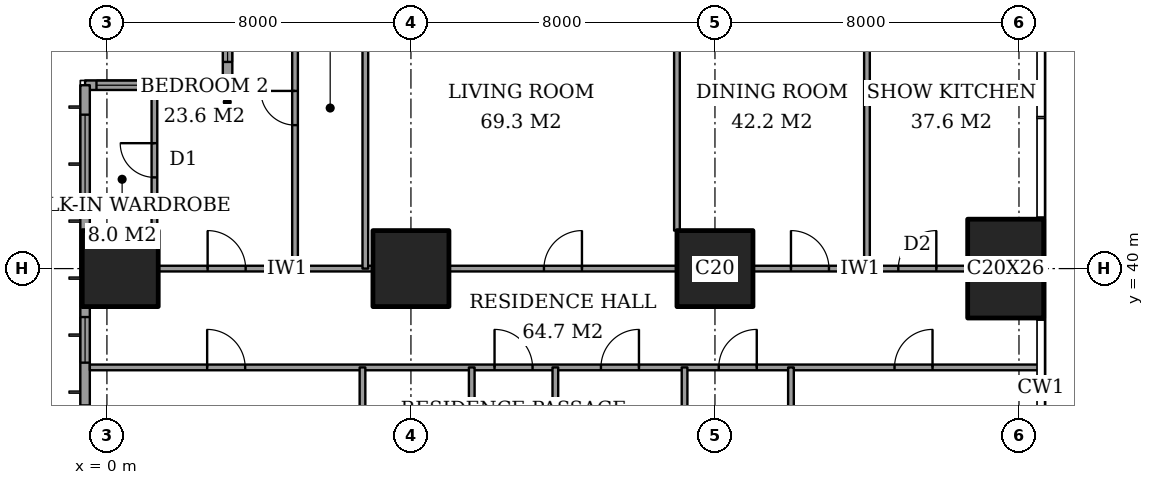
"""IFC4 building model, lengths in metres.
Left out: names, types, materials, properties, quantities, classifications, styles, units other than length and angle.
Written with IfcOpenShell. Run it as: python <this file> out.ifc"""

import sys

from ifc_helpers import new_model, si_unit, direction, frame, frame_2d, origin, origin_2d, place, context, subcontext, project, spatial, rectangle, extrude, element, fill, save


model = new_model("IFC4")
c1 = context("Model", 3, precision=1e-05, world=origin(), true_north=direction((0.0, 1.0)))
c2 = subcontext(c1, "Body", "Model", "MODEL_VIEW")
j1 = project(units=[si_unit("LENGTHUNIT", "METRE"), si_unit("PLANEANGLEUNIT", "RADIAN")], contexts=[c1])
p1 = place(None, origin())
s1 = spatial("IfcSite", under=j1, at=p1, CompositionType="ELEMENT")
p2 = place(p1, origin())
s2 = spatial("IfcBuilding", under=s1, at=p2, CompositionType="ELEMENT")
p3 = place(p2, frame((0.0, 0.0, 65.6)))
s3 = spatial("IfcBuildingStorey", under=s2, at=p3, CompositionType="ELEMENT", Elevation=65.6)
for number, where, z_axis, x_axis in (
    (1, (0.35, 40.0, 0.0), (0.0, 0.0, 1.0), (1.0, 0.0, 0.0)),
    (2, (8.0, 40.0, 0.0), (0.0, 0.0, 1.0), (1.0, 0.0, 0.0)),
    (3, (16.0, 40.0, 0.0), (0.0, 0.0, 1.0), (1.0, 0.0, 0.0)),
):
    element("IfcColumn", number, at=place(p3, frame(where, z_axis=z_axis, x_axis=x_axis)), inside=s3, PredefinedType="COLUMN", context=c2, shape_type="SweptSolid", body=[
        extrude(rectangle(XDim=2.0, YDim=2.0, at=origin_2d()), origin(), (0.0, 0.0, 1.0), 3.6),
    ])
p4 = place(p3, frame((23.65, 40.0, 0.0), z_axis=(0.0, 0.0, 1.0), x_axis=(1.0, 0.0, 0.0)))
e4 = element("IfcColumn", 4, at=p4, inside=s3, PredefinedType="COLUMN", context=c2, shape_type="SweptSolid", body=[
    extrude(rectangle(XDim=2.0, YDim=2.6, at=origin_2d()), origin(), (0.0, 0.0, 1.0), 3.6),
])
p5 = place(p3, frame((3.175, 48.575, 0.0), z_axis=(0.0, 0.0, 1.0), x_axis=(0.0, -1.0, 0.0)))
e5 = element("IfcWall", 5, at=p5, inside=s3, PredefinedType="SOLIDWALL", context=c2, shape_type="SweptSolid", body=[
    extrude(rectangle(XDim=3.75, YDim=0.25, at=frame_2d((1.875, 0.0))), origin(), (0.0, 0.0, 1.0), 3.6),
])
p6 = place(p5, frame((0.738, 0.0, 0.6)))
e6 = element("IfcOpeningElement", 6, at=p6, cuts=e5, PredefinedType="OPENING", context=c2, shape_type="SweptSolid", body=[
    extrude(rectangle(XDim=2.4, YDim=2.0, at=frame_2d((1.2, 1.0))), frame((0.0, 0.135, 0.0), z_axis=(0.0, -1.0, 0.0), x_axis=(1.0, 0.0, 0.0)), (0.0, 0.0, 1.0), 0.27),
])
p7 = place(p3, frame((3.175, 44.825, 0.0), z_axis=(0.0, 0.0, 1.0), x_axis=(-1.0, 0.0, 0.0)))
e7 = element("IfcWall", 7, at=p7, inside=s3, PredefinedType="SOLIDWALL", context=c2, shape_type="SweptSolid", body=[
    extrude(rectangle(XDim=3.75, YDim=0.25, at=frame_2d((1.875, 0.0))), origin(), (0.0, 0.0, 1.0), 3.6),
])
p8 = place(p7, frame((0.363, 0.0, 0.6)))
e8 = element("IfcOpeningElement", 8, at=p8, cuts=e7, PredefinedType="OPENING", context=c2, shape_type="SweptSolid", body=[
    extrude(rectangle(XDim=1.2, YDim=2.0, at=frame_2d((0.6, 1.0))), frame((0.0, 0.135, 0.0), z_axis=(0.0, -1.0, 0.0), x_axis=(1.0, 0.0, 0.0)), (0.0, 0.0, 1.0), 0.27),
])
p9 = place(p7, frame((2.25, 0.0, 0.6)))
e9 = element("IfcOpeningElement", 9, at=p9, cuts=e7, PredefinedType="OPENING", context=c2, shape_type="SweptSolid", body=[
    extrude(rectangle(XDim=1.2, YDim=2.0, at=frame_2d((0.6, 1.0))), frame((0.0, 0.135, 0.0), z_axis=(0.0, -1.0, 0.0), x_axis=(1.0, 0.0, 0.0)), (0.0, 0.0, 1.0), 0.27),
])
p10 = place(p3, frame((-0.575, 44.825, 0.0), z_axis=(0.0, 0.0, 1.0), x_axis=(0.0, -1.0, 0.0)))
e10 = element("IfcWall", 10, at=p10, inside=s3, PredefinedType="SOLIDWALL", context=c2, shape_type="SweptSolid", body=[
    extrude(rectangle(XDim=41.65, YDim=0.25, at=frame_2d((20.825, 0.0))), origin(), (0.0, 0.0, 1.0), 3.6),
])
p11 = place(p10, frame((0.775, 0.0, 0.6)))
e11 = element("IfcOpeningElement", 11, at=p11, cuts=e10, PredefinedType="OPENING", context=c2, shape_type="SweptSolid", body=[
    extrude(rectangle(XDim=2.4, YDim=2.0, at=frame_2d((1.2, 1.0))), frame((0.0, 0.135, 0.0), z_axis=(0.0, -1.0, 0.0), x_axis=(1.0, 0.0, 0.0)), (0.0, 0.0, 1.0), 0.27),
])
p12 = place(p10, frame((6.1, 0.0, 0.6)))
e12 = element("IfcOpeningElement", 12, at=p12, cuts=e10, PredefinedType="OPENING", context=c2, shape_type="SweptSolid", body=[
    extrude(rectangle(XDim=1.2, YDim=2.0, at=frame_2d((0.6, 1.0))), frame((0.0, 0.135, 0.0), z_axis=(0.0, -1.0, 0.0), x_axis=(1.0, 0.0, 0.0)), (0.0, 0.0, 1.0), 0.27),
])
p13 = place(p10, frame((8.425, 0.0, 0.6)))
e13 = element("IfcOpeningElement", 13, at=p13, cuts=e10, PredefinedType="OPENING", context=c2, shape_type="SweptSolid", body=[
    extrude(rectangle(XDim=2.4, YDim=2.0, at=frame_2d((1.2, 1.0))), frame((0.0, 0.135, 0.0), z_axis=(0.0, -1.0, 0.0), x_axis=(1.0, 0.0, 0.0)), (0.0, 0.0, 1.0), 0.27),
])
p14 = place(p10, frame((15.625, 0.0, 0.6)))
e14 = element("IfcOpeningElement", 14, at=p14, cuts=e10, PredefinedType="OPENING", context=c2, shape_type="SweptSolid", body=[
    extrude(rectangle(XDim=2.4, YDim=2.0, at=frame_2d((1.2, 1.0))), frame((0.0, 0.135, 0.0), z_axis=(0.0, -1.0, 0.0), x_axis=(1.0, 0.0, 0.0)), (0.0, 0.0, 1.0), 0.27),
])
p15 = place(p10, frame((23.625, 0.0, 0.6)))
e15 = element("IfcOpeningElement", 15, at=p15, cuts=e10, PredefinedType="OPENING", context=c2, shape_type="SweptSolid", body=[
    extrude(rectangle(XDim=2.4, YDim=2.0, at=frame_2d((1.2, 1.0))), frame((0.0, 0.135, 0.0), z_axis=(0.0, -1.0, 0.0), x_axis=(1.0, 0.0, 0.0)), (0.0, 0.0, 1.0), 0.27),
])
p16 = place(p10, frame((30.825, 0.0, 0.6)))
e16 = element("IfcOpeningElement", 16, at=p16, cuts=e10, PredefinedType="OPENING", context=c2, shape_type="SweptSolid", body=[
    extrude(rectangle(XDim=2.4, YDim=2.0, at=frame_2d((1.2, 1.0))), frame((0.0, 0.135, 0.0), z_axis=(0.0, -1.0, 0.0), x_axis=(1.0, 0.0, 0.0)), (0.0, 0.0, 1.0), 0.27),
])
p17 = place(p10, frame((34.5, 0.0, 0.6)))
e17 = element("IfcOpeningElement", 17, at=p17, cuts=e10, PredefinedType="OPENING", context=c2, shape_type="SweptSolid", body=[
    extrude(rectangle(XDim=1.2, YDim=2.0, at=frame_2d((0.6, 1.0))), frame((0.0, 0.135, 0.0), z_axis=(0.0, -1.0, 0.0), x_axis=(1.0, 0.0, 0.0)), (0.0, 0.0, 1.0), 0.27),
])
p18 = place(p10, frame((38.475, 0.0, 0.6)))
e18 = element("IfcOpeningElement", 18, at=p18, cuts=e10, PredefinedType="OPENING", context=c2, shape_type="SweptSolid", body=[
    extrude(rectangle(XDim=2.4, YDim=2.0, at=frame_2d((1.2, 1.0))), frame((0.0, 0.135, 0.0), z_axis=(0.0, -1.0, 0.0), x_axis=(1.0, 0.0, 0.0)), (0.0, 0.0, 1.0), 0.27),
])
p19 = place(p3, frame((-0.45, 37.4, 0.0), z_axis=(0.0, 0.0, 1.0), x_axis=(1.0, 0.0, 0.0)))
e19 = element("IfcWall", 19, at=p19, inside=s3, PredefinedType="PARTITIONING", context=c2, shape_type="SweptSolid", body=[
    extrude(rectangle(XDim=25.011, YDim=0.15, at=frame_2d((12.505, 0.0))), origin(), (0.0, 0.0, 1.0), 3.35),
])
p20 = place(p19, frame((10.65, 0.0, 0.0)))
e20 = element("IfcOpeningElement", 20, at=p20, cuts=e19, PredefinedType="OPENING", context=c2, shape_type="SweptSolid", body=[
    extrude(rectangle(XDim=1.0, YDim=2.1, at=frame_2d((0.5, 1.05))), frame((0.0, 0.085, 0.0), z_axis=(0.0, -1.0, 0.0), x_axis=(1.0, 0.0, 0.0)), (0.0, 0.0, 1.0), 0.17),
])
p21 = place(p19, frame((3.087, 0.0, 0.0)))
e21 = element("IfcOpeningElement", 21, at=p21, cuts=e19, PredefinedType="OPENING", context=c2, shape_type="SweptSolid", body=[
    extrude(rectangle(XDim=1.0, YDim=2.1, at=frame_2d((0.5, 1.05))), frame((0.0, 0.085, 0.0), z_axis=(0.0, -1.0, 0.0), x_axis=(1.0, 0.0, 0.0)), (0.0, 0.0, 1.0), 0.17),
])
p22 = place(p19, frame((13.45, 0.0, 0.0)))
e22 = element("IfcOpeningElement", 22, at=p22, cuts=e19, PredefinedType="OPENING", context=c2, shape_type="SweptSolid", body=[
    extrude(rectangle(XDim=1.0, YDim=2.1, at=frame_2d((0.5, 1.05))), frame((0.0, 0.085, 0.0), z_axis=(0.0, -1.0, 0.0), x_axis=(1.0, 0.0, 0.0)), (0.0, 0.0, 1.0), 0.17),
])
p23 = place(p19, frame((16.55, 0.0, 0.0)))
e23 = element("IfcOpeningElement", 23, at=p23, cuts=e19, PredefinedType="OPENING", context=c2, shape_type="SweptSolid", body=[
    extrude(rectangle(XDim=1.0, YDim=2.1, at=frame_2d((0.5, 1.05))), frame((0.0, 0.085, 0.0), z_axis=(0.0, -1.0, 0.0), x_axis=(1.0, 0.0, 0.0)), (0.0, 0.0, 1.0), 0.17),
])
p24 = place(p19, frame((21.175, 0.0, 0.0)))
e24 = element("IfcOpeningElement", 24, at=p24, cuts=e19, PredefinedType="OPENING", context=c2, shape_type="SweptSolid", body=[
    extrude(rectangle(XDim=1.0, YDim=2.1, at=frame_2d((0.5, 1.05))), frame((0.0, 0.085, 0.0), z_axis=(0.0, -1.0, 0.0), x_axis=(1.0, 0.0, 0.0)), (0.0, 0.0, 1.0), 0.17),
])
p25 = place(p3, frame((1.35, 40.0, 0.0), z_axis=(0.0, 0.0, 1.0), x_axis=(1.0, 0.0, 0.0)))
e25 = element("IfcWall", 25, at=p25, inside=s3, PredefinedType="PARTITIONING", context=c2, shape_type="SweptSolid", body=[
    extrude(rectangle(XDim=5.65, YDim=0.15, at=frame_2d((2.825, 0.0))), origin(), (0.0, 0.0, 1.0), 3.35),
])
p26 = place(p25, frame((1.3, 0.0, 0.0)))
e26 = element("IfcOpeningElement", 26, at=p26, cuts=e25, PredefinedType="OPENING", context=c2, shape_type="SweptSolid", body=[
    extrude(rectangle(XDim=1.0, YDim=2.1, at=frame_2d((0.5, 1.05))), frame((0.0, 0.085, 0.0), z_axis=(0.0, -1.0, 0.0), x_axis=(1.0, 0.0, 0.0)), (0.0, 0.0, 1.0), 0.17),
])
p27 = place(p3, frame((9.0, 40.0, 0.0), z_axis=(0.0, 0.0, 1.0), x_axis=(1.0, 0.0, 0.0)))
e27 = element("IfcWall", 27, at=p27, inside=s3, PredefinedType="PARTITIONING", context=c2, shape_type="SweptSolid", body=[
    extrude(rectangle(XDim=6.0, YDim=0.15, at=frame_2d((3.0, 0.0))), origin(), (0.0, 0.0, 1.0), 3.35),
])
p28 = place(p27, frame((2.5, 0.0, 0.0)))
e28 = element("IfcOpeningElement", 28, at=p28, cuts=e27, PredefinedType="OPENING", context=c2, shape_type="SweptSolid", body=[
    extrude(rectangle(XDim=1.0, YDim=2.1, at=frame_2d((0.5, 1.05))), frame((0.0, 0.085, 0.0), z_axis=(0.0, -1.0, 0.0), x_axis=(1.0, 0.0, 0.0)), (0.0, 0.0, 1.0), 0.17),
])
p29 = place(p3, frame((17.0, 40.0, 0.0), z_axis=(0.0, 0.0, 1.0), x_axis=(1.0, 0.0, 0.0)))
e29 = element("IfcWall", 29, at=p29, inside=s3, PredefinedType="PARTITIONING", context=c2, shape_type="SweptSolid", body=[
    extrude(rectangle(XDim=5.65, YDim=0.15, at=frame_2d((2.825, 0.0))), origin(), (0.0, 0.0, 1.0), 3.35),
])
p30 = place(p29, frame((1.0, 0.0, 0.0)))
e30 = element("IfcOpeningElement", 30, at=p30, cuts=e29, PredefinedType="OPENING", context=c2, shape_type="SweptSolid", body=[
    extrude(rectangle(XDim=1.0, YDim=2.1, at=frame_2d((0.5, 1.05))), frame((0.0, 0.085, 0.0), z_axis=(0.0, -1.0, 0.0), x_axis=(1.0, 0.0, 0.0)), (0.0, 0.0, 1.0), 0.17),
])
p31 = place(p29, frame((3.825, 0.0, 0.0)))
e31 = element("IfcOpeningElement", 31, at=p31, cuts=e29, PredefinedType="OPENING", context=c2, shape_type="SweptSolid", body=[
    extrude(rectangle(XDim=1.0, YDim=2.1, at=frame_2d((0.5, 1.05))), frame((0.0, 0.085, 0.0), z_axis=(0.0, -1.0, 0.0), x_axis=(1.0, 0.0, 0.0)), (0.0, 0.0, 1.0), 0.17),
])
p32 = place(p3, frame((1.25, 41.0, 0.0), z_axis=(0.0, 0.0, 1.0), x_axis=(0.0, 1.0, 0.0)))
e32 = element("IfcWall", 32, at=p32, inside=s3, PredefinedType="PARTITIONING", context=c2, shape_type="SweptSolid", body=[
    extrude(rectangle(XDim=3.7, YDim=0.15, at=frame_2d((1.85, 0.0))), origin(), (0.0, 0.0, 1.0), 3.35),
])
p33 = place(p32, frame((1.4, 0.0, 0.0)))
e33 = element("IfcOpeningElement", 33, at=p33, cuts=e32, PredefinedType="OPENING", context=c2, shape_type="SweptSolid", body=[
    extrude(rectangle(XDim=0.9, YDim=2.1, at=frame_2d((0.45, 1.05))), frame((0.0, 0.085, 0.0), z_axis=(0.0, -1.0, 0.0), x_axis=(1.0, 0.0, 0.0)), (0.0, 0.0, 1.0), 0.17),
])
p34 = place(p3, frame((4.95, 40.0, 0.0), z_axis=(0.0, 0.0, 1.0), x_axis=(0.0, 1.0, 0.0)))
e34 = element("IfcWall", 34, at=p34, inside=s3, PredefinedType="PARTITIONING", context=c2, shape_type="SweptSolid", body=[
    extrude(rectangle(XDim=8.45, YDim=0.15, at=frame_2d((4.225, 0.0))), origin(), (0.0, 0.0, 1.0), 3.35),
])
p35 = place(p34, frame((3.775, 0.0, 0.0)))
e35 = element("IfcOpeningElement", 35, at=p35, cuts=e34, PredefinedType="OPENING", context=c2, shape_type="SweptSolid", body=[
    extrude(rectangle(XDim=0.9, YDim=2.1, at=frame_2d((0.45, 1.05))), frame((0.0, 0.085, 0.0), z_axis=(0.0, -1.0, 0.0), x_axis=(1.0, 0.0, 0.0)), (0.0, 0.0, 1.0), 0.17),
])
p36 = place(p3, frame((6.725, 33.2, 0.0), z_axis=(0.0, 0.0, 1.0), x_axis=(0.0, 1.0, 0.0)))
e36 = element("IfcWall", 36, at=p36, inside=s3, PredefinedType="PARTITIONING", context=c2, shape_type="SweptSolid", body=[
    extrude(rectangle(XDim=4.2, YDim=0.15, at=frame_2d((2.1, 0.0))), origin(), (0.0, 0.0, 1.0), 3.35),
])
p37 = place(p36, frame((2.1, 0.0, 0.0)))
e37 = element("IfcOpeningElement", 37, at=p37, cuts=e36, PredefinedType="OPENING", context=c2, shape_type="SweptSolid", body=[
    extrude(rectangle(XDim=0.9, YDim=2.1, at=frame_2d((0.45, 1.05))), frame((0.0, 0.085, 0.0), z_axis=(0.0, -1.0, 0.0), x_axis=(1.0, 0.0, 0.0)), (0.0, 0.0, 1.0), 0.17),
])
p38 = place(p3, frame((6.8, 40.0, 0.0), z_axis=(0.0, 0.0, 1.0), x_axis=(0.0, 1.0, 0.0)))
e38 = element("IfcWall", 38, at=p38, inside=s3, PredefinedType="PARTITIONING", context=c2, shape_type="SweptSolid", body=[
    extrude(rectangle(XDim=8.45, YDim=0.15, at=frame_2d((4.225, 0.0))), origin(), (0.0, 0.0, 1.0), 3.35),
])
p39 = place(p3, frame((9.6, 28.0, 0.0), z_axis=(0.0, 0.0, 1.0), x_axis=(0.0, 1.0, 0.0)))
e39 = element("IfcWall", 39, at=p39, inside=s3, PredefinedType="PARTITIONING", context=c2, shape_type="SweptSolid", body=[
    extrude(rectangle(XDim=9.4, YDim=0.15, at=frame_2d((4.7, 0.0))), origin(), (0.0, 0.0, 1.0), 3.35),
])
p40 = place(p39, frame((0.5, 0.0, 0.0)))
e40 = element("IfcOpeningElement", 40, at=p40, cuts=e39, PredefinedType="OPENING", context=c2, shape_type="SweptSolid", body=[
    extrude(rectangle(XDim=1.0, YDim=2.1, at=frame_2d((0.5, 1.05))), frame((0.0, 0.085, 0.0), z_axis=(0.0, -1.0, 0.0), x_axis=(1.0, 0.0, 0.0)), (0.0, 0.0, 1.0), 0.17),
])
p41 = place(p3, frame((11.8, 30.0, 0.0), z_axis=(0.0, 0.0, 1.0), x_axis=(0.0, 1.0, 0.0)))
e41 = element("IfcWall", 41, at=p41, inside=s3, PredefinedType="PARTITIONING", context=c2, shape_type="SweptSolid", body=[
    extrude(rectangle(XDim=7.4, YDim=0.15, at=frame_2d((3.7, 0.0))), origin(), (0.0, 0.0, 1.0), 3.35),
])
p42 = place(p3, frame((15.0, 41.0, 0.0), z_axis=(0.0, 0.0, 1.0), x_axis=(0.0, 1.0, 0.0)))
e42 = element("IfcWall", 42, at=p42, inside=s3, PredefinedType="PARTITIONING", context=c2, shape_type="SweptSolid", body=[
    extrude(rectangle(XDim=5.65, YDim=0.15, at=frame_2d((2.825, 0.0))), origin(), (0.0, 0.0, 1.0), 3.35),
])
p43 = place(p3, frame((15.2, 33.2, 0.0), z_axis=(0.0, 0.0, 1.0), x_axis=(0.0, 1.0, 0.0)))
e43 = element("IfcWall", 43, at=p43, inside=s3, PredefinedType="PARTITIONING", context=c2, shape_type="SweptSolid", body=[
    extrude(rectangle(XDim=4.2, YDim=0.15, at=frame_2d((2.1, 0.0))), origin(), (0.0, 0.0, 1.0), 3.35),
])
p44 = place(p3, frame((18.0, 31.4, 0.0), z_axis=(0.0, 0.0, 1.0), x_axis=(0.0, 1.0, 0.0)))
e44 = element("IfcWall", 44, at=p44, inside=s3, PredefinedType="PARTITIONING", context=c2, shape_type="SweptSolid", body=[
    extrude(rectangle(XDim=6.0, YDim=0.15, at=frame_2d((3.0, 0.0))), origin(), (0.0, 0.0, 1.0), 3.35),
])
p45 = place(p3, frame((20.0, 40.0, 0.0), z_axis=(0.0, 0.0, 1.0), x_axis=(0.0, 1.0, 0.0)))
e45 = element("IfcWall", 45, at=p45, inside=s3, PredefinedType="PARTITIONING", context=c2, shape_type="SweptSolid", body=[
    extrude(rectangle(XDim=8.45, YDim=0.15, at=frame_2d((4.225, 0.0))), origin(), (0.0, 0.0, 1.0), 3.35),
])
p46 = place(p6, origin())
e46 = element("IfcWindow", 46, at=p46, inside=s3, PartitioningType="SINGLE_PANEL", PredefinedType="WINDOW", context=c2, shape_type="SweptSolid", body=[
    extrude(rectangle(XDim=2.4, YDim=2.0, at=frame_2d((1.2, 1.0))), frame((0.0, 0.03, 0.0), z_axis=(0.0, -1.0, 0.0), x_axis=(1.0, 0.0, 0.0)), (0.0, 0.0, 1.0), 0.06),
])
fill(e6, e46)
p47 = place(p8, origin())
e47 = element("IfcWindow", 47, at=p47, inside=s3, PartitioningType="SINGLE_PANEL", PredefinedType="WINDOW", context=c2, shape_type="SweptSolid", body=[
    extrude(rectangle(XDim=1.2, YDim=2.0, at=frame_2d((0.6, 1.0))), frame((0.0, 0.03, 0.0), z_axis=(0.0, -1.0, 0.0), x_axis=(1.0, 0.0, 0.0)), (0.0, 0.0, 1.0), 0.06),
])
fill(e8, e47)
p48 = place(p9, origin())
e48 = element("IfcWindow", 48, at=p48, inside=s3, PartitioningType="SINGLE_PANEL", PredefinedType="WINDOW", context=c2, shape_type="SweptSolid", body=[
    extrude(rectangle(XDim=1.2, YDim=2.0, at=frame_2d((0.6, 1.0))), frame((0.0, 0.03, 0.0), z_axis=(0.0, -1.0, 0.0), x_axis=(1.0, 0.0, 0.0)), (0.0, 0.0, 1.0), 0.06),
])
fill(e9, e48)
p49 = place(p11, origin())
e49 = element("IfcWindow", 49, at=p49, inside=s3, PartitioningType="SINGLE_PANEL", PredefinedType="WINDOW", context=c2, shape_type="SweptSolid", body=[
    extrude(rectangle(XDim=2.4, YDim=2.0, at=frame_2d((1.2, 1.0))), frame((0.0, 0.03, 0.0), z_axis=(0.0, -1.0, 0.0), x_axis=(1.0, 0.0, 0.0)), (0.0, 0.0, 1.0), 0.06),
])
fill(e11, e49)
p50 = place(p12, origin())
e50 = element("IfcWindow", 50, at=p50, inside=s3, PartitioningType="SINGLE_PANEL", PredefinedType="WINDOW", context=c2, shape_type="SweptSolid", body=[
    extrude(rectangle(XDim=1.2, YDim=2.0, at=frame_2d((0.6, 1.0))), frame((0.0, 0.03, 0.0), z_axis=(0.0, -1.0, 0.0), x_axis=(1.0, 0.0, 0.0)), (0.0, 0.0, 1.0), 0.06),
])
fill(e12, e50)
p51 = place(p33, origin())
e51 = element("IfcDoor", 51, at=p51, inside=s3, OperationType="SINGLE_SWING_LEFT", PredefinedType="DOOR", context=c2, shape_type="SweptSolid", body=[
    extrude(rectangle(XDim=0.9, YDim=2.1, at=frame_2d((0.45, 1.05))), frame((0.0, 0.025, 0.0), z_axis=(0.0, -1.0, 0.0), x_axis=(1.0, 0.0, 0.0)), (0.0, 0.0, 1.0), 0.05),
])
fill(e33, e51)
p52 = place(p26, origin())
e52 = element("IfcDoor", 52, at=p52, inside=s3, OperationType="SINGLE_SWING_RIGHT", PredefinedType="DOOR", context=c2, shape_type="SweptSolid", body=[
    extrude(rectangle(XDim=1.0, YDim=2.1, at=frame_2d((0.5, 1.05))), frame((0.0, 0.025, 0.0), z_axis=(0.0, -1.0, 0.0), x_axis=(1.0, 0.0, 0.0)), (0.0, 0.0, 1.0), 0.05),
])
fill(e26, e52)
p53 = place(p35, origin())
e53 = element("IfcDoor", 53, at=p53, inside=s3, OperationType="SINGLE_SWING_LEFT", PredefinedType="DOOR", context=c2, shape_type="SweptSolid", body=[
    extrude(rectangle(XDim=0.9, YDim=2.1, at=frame_2d((0.45, 1.05))), frame((0.0, 0.025, 0.0), z_axis=(0.0, -1.0, 0.0), x_axis=(1.0, 0.0, 0.0)), (0.0, 0.0, 1.0), 0.05),
])
fill(e35, e53)
p54 = place(p28, origin())
e54 = element("IfcDoor", 54, at=p54, inside=s3, OperationType="SINGLE_SWING_LEFT", PredefinedType="DOOR", context=c2, shape_type="SweptSolid", body=[
    extrude(rectangle(XDim=1.0, YDim=2.1, at=frame_2d((0.5, 1.05))), frame((0.0, 0.025, 0.0), z_axis=(0.0, -1.0, 0.0), x_axis=(1.0, 0.0, 0.0)), (0.0, 0.0, 1.0), 0.05),
])
fill(e28, e54)
p55 = place(p30, origin())
e55 = element("IfcDoor", 55, at=p55, inside=s3, OperationType="SINGLE_SWING_RIGHT", PredefinedType="DOOR", context=c2, shape_type="SweptSolid", body=[
    extrude(rectangle(XDim=1.0, YDim=2.1, at=frame_2d((0.5, 1.05))), frame((0.0, 0.025, 0.0), z_axis=(0.0, -1.0, 0.0), x_axis=(1.0, 0.0, 0.0)), (0.0, 0.0, 1.0), 0.05),
])
fill(e30, e55)
p56 = place(p31, origin())
e56 = element("IfcDoor", 56, at=p56, inside=s3, OperationType="SINGLE_SWING_LEFT", PredefinedType="DOOR", context=c2, shape_type="SweptSolid", body=[
    extrude(rectangle(XDim=1.0, YDim=2.1, at=frame_2d((0.5, 1.05))), frame((0.0, 0.025, 0.0), z_axis=(0.0, -1.0, 0.0), x_axis=(1.0, 0.0, 0.0)), (0.0, 0.0, 1.0), 0.05),
])
fill(e31, e56)
p57 = place(p20, origin())
e57 = element("IfcDoor", 57, at=p57, inside=s3, OperationType="SINGLE_SWING_RIGHT", PredefinedType="DOOR", context=c2, shape_type="SweptSolid", body=[
    extrude(rectangle(XDim=1.0, YDim=2.1, at=frame_2d((0.5, 1.05))), frame((0.0, 0.025, 0.0), z_axis=(0.0, -1.0, 0.0), x_axis=(1.0, 0.0, 0.0)), (0.0, 0.0, 1.0), 0.05),
])
fill(e20, e57)
p58 = place(p21, origin())
e58 = element("IfcDoor", 58, at=p58, inside=s3, OperationType="SINGLE_SWING_RIGHT", PredefinedType="DOOR", context=c2, shape_type="SweptSolid", body=[
    extrude(rectangle(XDim=1.0, YDim=2.1, at=frame_2d((0.5, 1.05))), frame((0.0, 0.025, 0.0), z_axis=(0.0, -1.0, 0.0), x_axis=(1.0, 0.0, 0.0)), (0.0, 0.0, 1.0), 0.05),
])
fill(e21, e58)
p59 = place(p22, origin())
e59 = element("IfcDoor", 59, at=p59, inside=s3, OperationType="SINGLE_SWING_LEFT", PredefinedType="DOOR", context=c2, shape_type="SweptSolid", body=[
    extrude(rectangle(XDim=1.0, YDim=2.1, at=frame_2d((0.5, 1.05))), frame((0.0, 0.025, 0.0), z_axis=(0.0, -1.0, 0.0), x_axis=(1.0, 0.0, 0.0)), (0.0, 0.0, 1.0), 0.05),
])
fill(e22, e59)
p60 = place(p23, origin())
e60 = element("IfcDoor", 60, at=p60, inside=s3, OperationType="SINGLE_SWING_LEFT", PredefinedType="DOOR", context=c2, shape_type="SweptSolid", body=[
    extrude(rectangle(XDim=1.0, YDim=2.1, at=frame_2d((0.5, 1.05))), frame((0.0, 0.025, 0.0), z_axis=(0.0, -1.0, 0.0), x_axis=(1.0, 0.0, 0.0)), (0.0, 0.0, 1.0), 0.05),
])
fill(e23, e60)
p61 = place(p24, origin())
e61 = element("IfcDoor", 61, at=p61, inside=s3, OperationType="SINGLE_SWING_LEFT", PredefinedType="DOOR", context=c2, shape_type="SweptSolid", body=[
    extrude(rectangle(XDim=1.0, YDim=2.1, at=frame_2d((0.5, 1.05))), frame((0.0, 0.025, 0.0), z_axis=(0.0, -1.0, 0.0), x_axis=(1.0, 0.0, 0.0)), (0.0, 0.0, 1.0), 0.05),
])
fill(e24, e61)
save(model, sys.argv[1])
